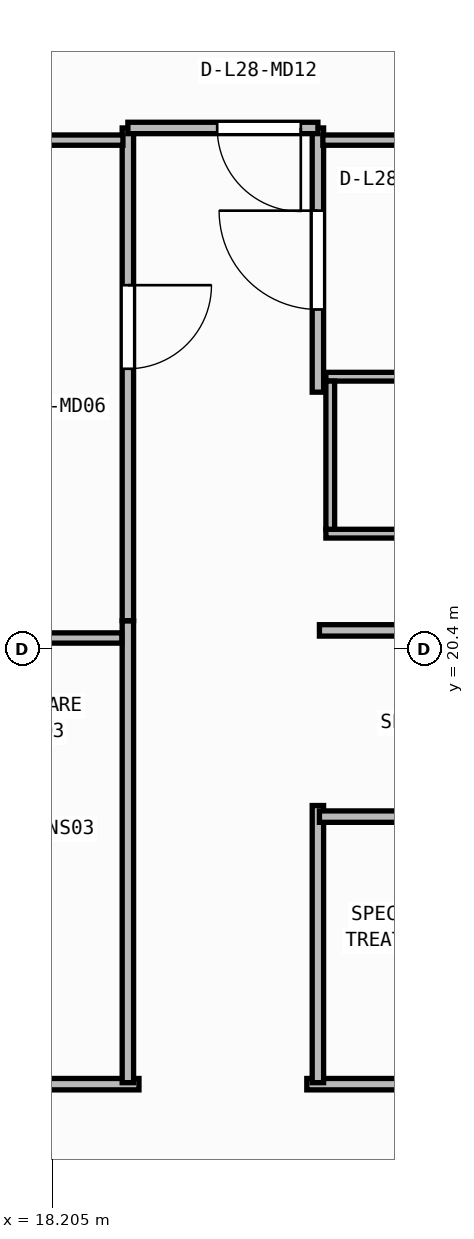
"""IFC4 building model, lengths in metres.
Left out: names, types, materials, properties, quantities, classifications, styles, units other than length and angle.
Written with IfcOpenShell. Run it as: python <this file> out.ifc"""

import sys

from ifc_helpers import new_model, si_unit, direction, frame, frame_2d, origin, place, context, subcontext, project, spatial, rectangle, extrude, element, fill, save


model = new_model("IFC4")
c1 = context("Model", 3, precision=1e-05, world=origin(), true_north=direction((0.0, 1.0)))
c2 = subcontext(c1, "Body", "Model", "MODEL_VIEW")
j1 = project(units=[si_unit("LENGTHUNIT", "METRE"), si_unit("PLANEANGLEUNIT", "RADIAN")], contexts=[c1])
p1 = place(None, origin())
s1 = spatial("IfcSite", under=j1, at=p1, CompositionType="ELEMENT")
p2 = place(p1, origin())
s2 = spatial("IfcBuilding", under=s1, at=p2, CompositionType="ELEMENT")
p3 = place(p2, frame((0.0, 0.0, 115.2)))
s3 = spatial("IfcBuildingStorey", under=s2, at=p3, CompositionType="ELEMENT", Elevation=115.2)
for number, where, z_axis, x_axis in (
    (1, (21.805, 21.923, 0.0), (0.0, 0.0, 1.0), (1.0, 0.0, 0.0)),
    (2, (21.805, 23.988, 0.0), (0.0, 0.0, 1.0), (1.0, 0.0, 0.0)),
):
    element("IfcWall", number, at=place(p3, frame(where, z_axis=z_axis, x_axis=x_axis)), inside=s3, PredefinedType="PARTITIONING", context=c2, shape_type="SweptSolid", body=[
        extrude(rectangle(XDim=2.15, YDim=0.115, at=frame_2d((1.075, 0.0))), origin(), (0.0, 0.0, 1.0), 3.71),
    ])
p4 = place(p3, frame((21.863, 21.98, 0.0), z_axis=(0.0, 0.0, 1.0), x_axis=(0.0, 1.0, 0.0)))
e3 = element("IfcWall", 3, at=p4, inside=s3, PredefinedType="PARTITIONING", context=c2, shape_type="SweptSolid", body=[
    extrude(rectangle(XDim=1.95, YDim=0.115, at=frame_2d((0.975, 0.0))), origin(), (0.0, 0.0, 1.0), 3.71),
])
p5 = place(p3, frame((19.346, 14.68, 0.0), z_axis=(0.0, 0.0, 1.0), x_axis=(-1.0, 0.0, 0.0)))
e4 = element("IfcWall", 4, at=p5, inside=s3, PredefinedType="PARTITIONING", context=c2, shape_type="SweptSolid", body=[
    extrude(rectangle(XDim=4.488, YDim=0.15, at=frame_2d((2.244, 0.0))), origin(), (0.0, 0.0, 1.0), 3.71),
])
p6 = place(p5, frame((1.594, 0.0, 0.0)))
e5 = element("IfcOpeningElement", 5, at=p6, cuts=e4, PredefinedType="OPENING", context=c2, shape_type="SweptSolid", body=[
    extrude(rectangle(XDim=1.3, YDim=2.15, at=frame_2d((0.65, 1.075))), frame((0.0, 0.085, 0.0), z_axis=(0.0, -1.0, 0.0), x_axis=(1.0, 0.0, 0.0)), (0.0, 0.0, 1.0), 0.17),
])
p7 = place(p3, frame((29.806, 14.68, 0.0), z_axis=(0.0, 0.0, 1.0), x_axis=(-1.0, 0.0, 0.0)))
e6 = element("IfcWall", 6, at=p7, inside=s3, PredefinedType="PARTITIONING", context=c2, shape_type="SweptSolid", body=[
    extrude(rectangle(XDim=8.252, YDim=0.15, at=frame_2d((4.126, 0.0))), origin(), (0.0, 0.0, 1.0), 3.71),
])
p8 = place(p7, frame((3.576, 0.0, 0.0)))
e7 = element("IfcOpeningElement", 7, at=p8, cuts=e6, PredefinedType="OPENING", context=c2, shape_type="SweptSolid", body=[
    extrude(rectangle(XDim=1.1, YDim=2.1, at=frame_2d((0.55, 1.05))), frame((0.0, 0.085, 0.0), z_axis=(0.0, -1.0, 0.0), x_axis=(1.0, 0.0, 0.0)), (0.0, 0.0, 1.0), 0.17),
])
p9 = place(p3, frame((19.2, 20.776, 0.0), z_axis=(0.0, 0.0, 1.0), x_axis=(0.0, -1.0, 0.0)))
e8 = element("IfcWall", 8, at=p9, inside=s3, PredefinedType="PARTITIONING", context=c2, shape_type="SweptSolid", body=[
    extrude(rectangle(XDim=6.076, YDim=0.15, at=frame_2d((3.038, 0.0))), origin(), (0.0, 0.0, 1.0), 3.71),
])
p10 = place(p3, frame((21.7, 14.7, 0.0), z_axis=(0.0, 0.0, 1.0), x_axis=(0.0, 1.0, 0.0)))
e9 = element("IfcWall", 9, at=p10, inside=s3, PredefinedType="PARTITIONING", context=c2, shape_type="SweptSolid", body=[
    extrude(rectangle(XDim=3.646, YDim=0.15, at=frame_2d((1.823, 0.0))), origin(), (0.0, 0.0, 1.0), 3.71),
])
p11 = place(p3, frame((19.2, 27.26, 0.0), z_axis=(0.0, 0.0, 1.0), x_axis=(0.0, -1.0, 0.0)))
e10 = element("IfcWall", 10, at=p11, inside=s3, PredefinedType="PARTITIONING", context=c2, shape_type="SweptSolid", body=[
    extrude(rectangle(XDim=6.482, YDim=0.15, at=frame_2d((3.241, 0.0))), origin(), (0.0, 0.0, 1.0), 3.71),
])
p12 = place(p11, frame((2.068, 0.0, 0.0)))
e11 = element("IfcOpeningElement", 11, at=p12, cuts=e10, PredefinedType="OPENING", context=c2, shape_type="SweptSolid", body=[
    extrude(rectangle(XDim=1.1, YDim=2.1, at=frame_2d((0.55, 1.05))), frame((0.0, 0.085, 0.0), z_axis=(0.0, -1.0, 0.0), x_axis=(1.0, 0.0, 0.0)), (0.0, 0.0, 1.0), 0.17),
])
p13 = place(p3, frame((21.7, 23.784, 0.0), z_axis=(0.0, 0.0, 1.0), x_axis=(0.0, 1.0, 0.0)))
e12 = element("IfcWall", 12, at=p13, inside=s3, PredefinedType="PARTITIONING", context=c2, shape_type="SweptSolid", body=[
    extrude(rectangle(XDim=3.476, YDim=0.15, at=frame_2d((1.738, 0.0))), origin(), (0.0, 0.0, 1.0), 3.71),
])
p14 = place(p13, frame((1.088, 0.0, 0.0)))
e13 = element("IfcOpeningElement", 13, at=p14, cuts=e12, PredefinedType="OPENING", context=c2, shape_type="SweptSolid", body=[
    extrude(rectangle(XDim=1.3, YDim=2.15, at=frame_2d((0.65, 1.075))), frame((0.0, 0.085, 0.0), z_axis=(0.0, -1.0, 0.0), x_axis=(1.0, 0.0, 0.0)), (0.0, 0.0, 1.0), 0.17),
])
p15 = place(p3, frame((21.7, 27.26, 0.0), z_axis=(0.0, 0.0, 1.0), x_axis=(-1.0, 0.0, 0.0)))
e14 = element("IfcWall", 14, at=p15, inside=s3, PredefinedType="PARTITIONING", context=c2, shape_type="SweptSolid", body=[
    extrude(rectangle(XDim=2.5, YDim=0.15, at=frame_2d((1.25, 0.0))), origin(), (0.0, 0.0, 1.0), 3.71),
])
p16 = place(p15, frame((0.225, 0.0, 0.0)))
e15 = element("IfcOpeningElement", 15, at=p16, cuts=e14, PredefinedType="OPENING", context=c2, shape_type="SweptSolid", body=[
    extrude(rectangle(XDim=1.1, YDim=2.1, at=frame_2d((0.55, 1.05))), frame((0.0, 0.085, 0.0), z_axis=(0.0, -1.0, 0.0), x_axis=(1.0, 0.0, 0.0)), (0.0, 0.0, 1.0), 0.17),
])
p17 = place(p3, frame((21.72, 18.2, 0.0), z_axis=(0.0, 0.0, 1.0), x_axis=(1.0, 0.0, 0.0)))
e16 = element("IfcWall", 16, at=p17, inside=s3, PredefinedType="PARTITIONING", context=c2, shape_type="SweptSolid", body=[
    extrude(rectangle(XDim=8.086, YDim=0.15, at=frame_2d((4.043, 0.0))), origin(), (0.0, 0.0, 1.0), 3.71),
])
p18 = place(p3, frame((26.566, 20.65, 0.0), z_axis=(0.0, 0.0, 1.0), x_axis=(-1.0, 0.0, 0.0)))
e17 = element("IfcWall", 17, at=p18, inside=s3, PredefinedType="PARTITIONING", context=c2, shape_type="SweptSolid", body=[
    extrude(rectangle(XDim=4.846, YDim=0.15, at=frame_2d((2.423, 0.0))), origin(), (0.0, 0.0, 1.0), 3.083),
])
p19 = place(p3, frame((19.12, 20.55, 0.0), z_axis=(0.0, 0.0, 1.0), x_axis=(-1.0, 0.0, 0.0)))
e18 = element("IfcWall", 18, at=p19, inside=s3, PredefinedType="PARTITIONING", context=c2, shape_type="SweptSolid", body=[
    extrude(rectangle(XDim=4.433, YDim=0.135, at=frame_2d((2.216, 0.0))), origin(), (0.0, 0.0, 1.0), 3.083),
])
p20 = place(p3, frame((19.135, 27.1, 0.0), z_axis=(0.0, 0.0, 1.0), x_axis=(-1.0, 0.0, 0.0)))
e19 = element("IfcWall", 19, at=p20, inside=s3, PredefinedType="PARTITIONING", context=c2, shape_type="SweptSolid", body=[
    extrude(rectangle(XDim=10.667, YDim=0.135, at=frame_2d((5.334, 0.0))), origin(), (0.0, 0.0, 1.0), 3.71),
])
p21 = place(p3, frame((26.34, 27.1, 0.0), z_axis=(0.0, 0.0, 1.0), x_axis=(-1.0, 0.0, 0.0)))
e20 = element("IfcWall", 20, at=p21, inside=s3, PredefinedType="PARTITIONING", context=c2, shape_type="SweptSolid", body=[
    extrude(rectangle(XDim=4.575, YDim=0.135, at=frame_2d((2.288, 0.0))), origin(), (0.0, 0.0, 1.0), 3.71),
])
p22 = place(p12, origin())
e21 = element("IfcDoor", 21, at=p22, inside=s3, OperationType="SINGLE_SWING_LEFT", PredefinedType="DOOR", context=c2, shape_type="SweptSolid", body=[
    extrude(rectangle(XDim=1.1, YDim=2.1, at=frame_2d((0.55, 1.05))), frame((0.0, 0.025, 0.0), z_axis=(0.0, -1.0, 0.0), x_axis=(1.0, 0.0, 0.0)), (0.0, 0.0, 1.0), 0.05),
])
fill(e11, e21)
p23 = place(p14, origin())
e22 = element("IfcDoor", 22, at=p23, inside=s3, OperationType="SINGLE_SWING_RIGHT", PredefinedType="DOOR", context=c2, shape_type="SweptSolid", body=[
    extrude(rectangle(XDim=1.3, YDim=2.15, at=frame_2d((0.65, 1.075))), frame((0.0, 0.025, 0.0), z_axis=(0.0, -1.0, 0.0), x_axis=(1.0, 0.0, 0.0)), (0.0, 0.0, 1.0), 0.05),
])
fill(e13, e22)
p24 = place(p16, origin())
e23 = element("IfcDoor", 23, at=p24, inside=s3, OperationType="SINGLE_SWING_LEFT", PredefinedType="DOOR", context=c2, shape_type="SweptSolid", body=[
    extrude(rectangle(XDim=1.1, YDim=2.1, at=frame_2d((0.55, 1.05))), frame((0.0, 0.025, 0.0), z_axis=(0.0, -1.0, 0.0), x_axis=(1.0, 0.0, 0.0)), (0.0, 0.0, 1.0), 0.05),
])
fill(e15, e23)
save(model, sys.argv[1])
